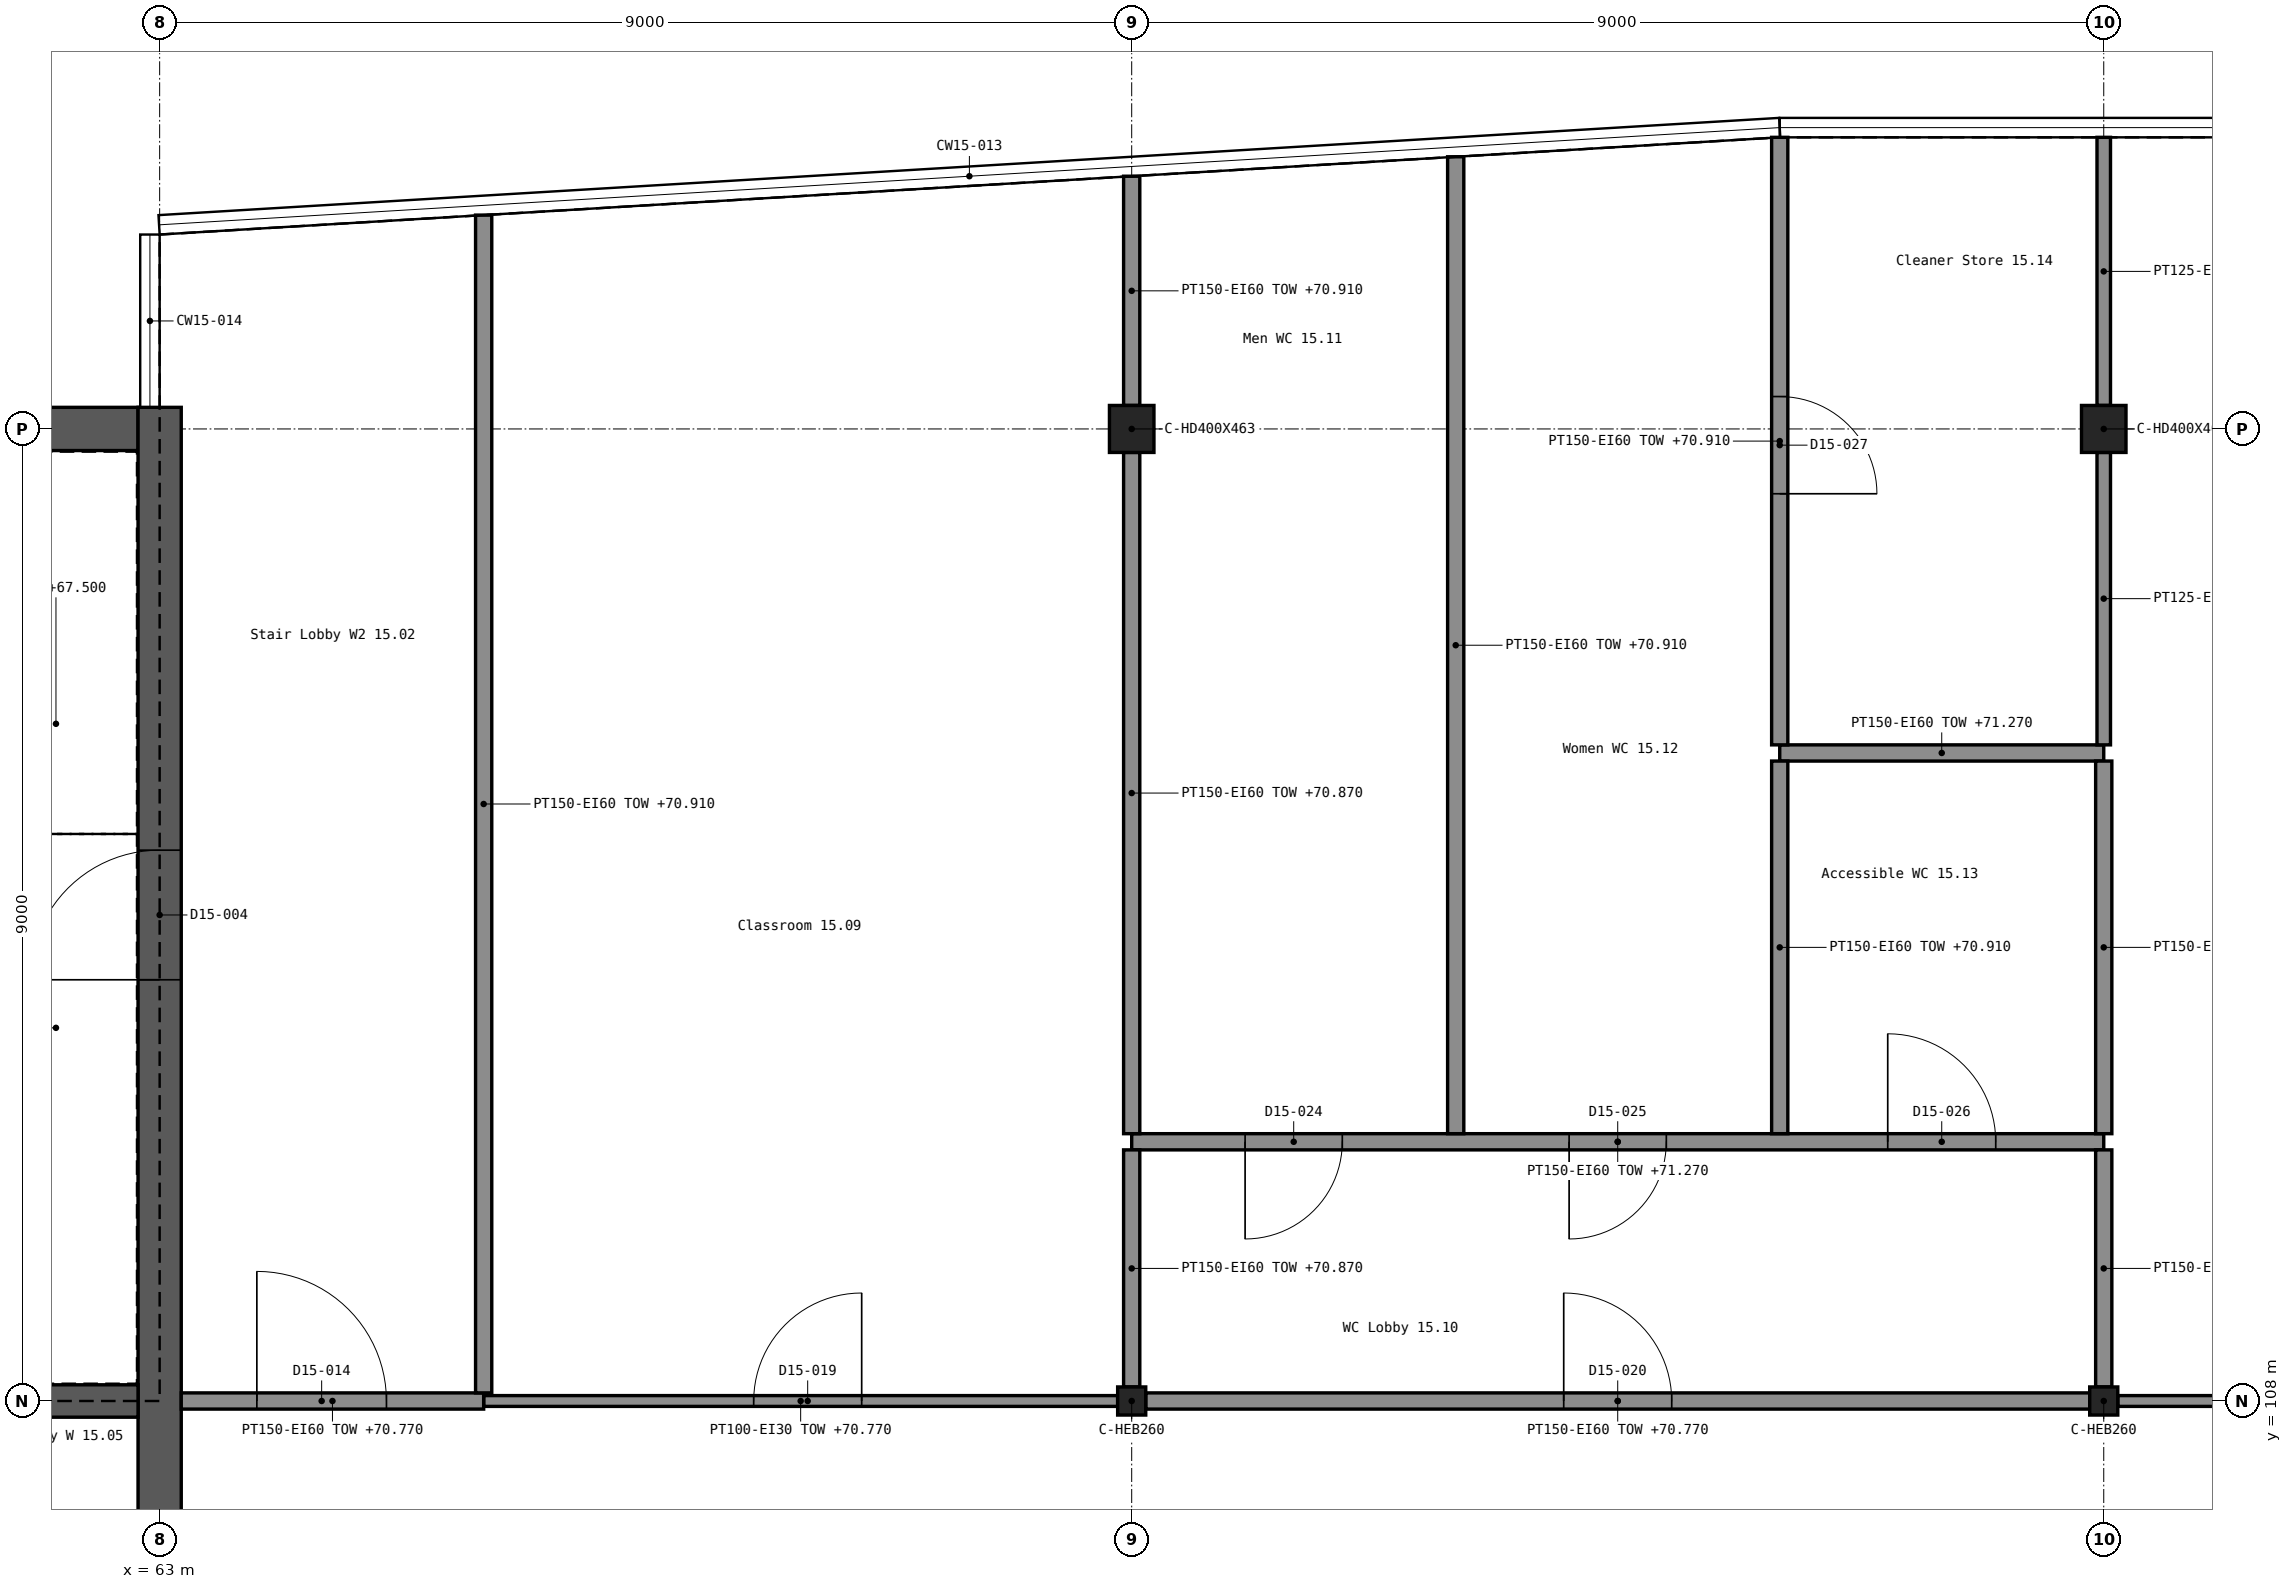
"""IFC4 building model, lengths in metres.
Left out: names, types, materials, properties, quantities, classifications, styles, units other than length and angle.
Written with IfcOpenShell. Run it as: python <this file> out.ifc"""

import sys

from ifc_helpers import new_model, si_unit, direction, frame, frame_2d, origin, origin_2d, place, context, subcontext, project, spatial, rectangle, i_section, extrude, element, fill, save


model = new_model("IFC4")
c1 = context("Model", 3, precision=1e-05, world=origin(), true_north=direction((0.0, 1.0)))
c2 = subcontext(c1, "Body", "Model", "MODEL_VIEW")
j1 = project(units=[si_unit("LENGTHUNIT", "METRE"), si_unit("PLANEANGLEUNIT", "RADIAN")], contexts=[c1])
p1 = place(None, origin())
s1 = spatial("IfcSite", under=j1, at=p1, CompositionType="ELEMENT")
p2 = place(p1, origin())
s2 = spatial("IfcBuilding", under=s1, at=p2, CompositionType="ELEMENT")
p3 = place(p2, frame((0.0, 0.0, 67.5)))
s3 = spatial("IfcBuildingStorey", under=s2, at=p3, CompositionType="ELEMENT", Elevation=67.5)
p4 = place(p3, frame((54.2, 117.0, 0.0), z_axis=(0.0, 0.0, 1.0), x_axis=(1.0, 0.0, 0.0)))
e1 = element("IfcWall", 1, at=p4, inside=s3, PredefinedType="SHEAR", context=c2, shape_type="SweptSolid", body=[
    extrude(rectangle(XDim=8.6, YDim=0.4, at=frame_2d((4.3, 0.0))), origin(), (0.0, 0.0, 1.0), 3.9),
])
p5 = place(p4, frame((4.05, 0.0, 1.2)))
e2 = element("IfcOpeningElement", 2, at=p5, cuts=e1, PredefinedType="OPENING", context=c2, shape_type="SweptSolid", body=[
    extrude(rectangle(XDim=0.9, YDim=1.5, at=frame_2d((0.45, 0.75))), frame((0.0, 0.211, 0.0), z_axis=(0.0, -1.0, 0.0), x_axis=(1.0, 0.0, 0.0)), (0.0, 0.0, 1.0), 0.422),
])
p6 = place(p3, frame((63.0, 89.8, 0.0), z_axis=(0.0, 0.0, 1.0), x_axis=(0.0, 1.0, 0.0)))
e3 = element("IfcWall", 3, at=p6, inside=s3, PredefinedType="SHEAR", context=c2, shape_type="SweptSolid", body=[
    extrude(rectangle(XDim=27.4, YDim=0.4, at=frame_2d((13.7, 0.0))), origin(), (0.0, 0.0, 1.0), 3.9),
])
p7 = place(p6, frame((4.1, 0.0, 0.0)))
e4 = element("IfcOpeningElement", 4, at=p7, cuts=e3, PredefinedType="OPENING", context=c2, shape_type="SweptSolid", body=[
    extrude(rectangle(XDim=1.2, YDim=2.1, at=frame_2d((0.6, 1.05))), frame((0.0, 0.211, 0.0), z_axis=(0.0, -1.0, 0.0), x_axis=(1.0, 0.0, 0.0)), (0.0, 0.0, 1.0), 0.422),
])
p8 = place(p6, frame((22.1, 0.0, 0.0)))
e5 = element("IfcOpeningElement", 5, at=p8, cuts=e3, PredefinedType="OPENING", context=c2, shape_type="SweptSolid", body=[
    extrude(rectangle(XDim=1.2, YDim=2.1, at=frame_2d((0.6, 1.05))), frame((0.0, 0.211, 0.0), z_axis=(0.0, -1.0, 0.0), x_axis=(1.0, 0.0, 0.0)), (0.0, 0.0, 1.0), 0.422),
])
p9 = place(p6, frame((12.5, 0.0, 0.0)))
e6 = element("IfcOpeningElement", 6, at=p9, cuts=e3, PredefinedType="OPENING", context=c2, shape_type="SweptSolid", body=[
    extrude(rectangle(XDim=2.0, YDim=2.1, at=frame_2d((1.0, 1.05))), frame((0.0, 0.211, 0.0), z_axis=(0.0, -1.0, 0.0), x_axis=(1.0, 0.0, 0.0)), (0.0, 0.0, 1.0), 0.422),
])
p10 = place(p3, frame((54.2, 108.0, 0.0), z_axis=(0.0, 0.0, 1.0), x_axis=(1.0, 0.0, 0.0)))
e7 = element("IfcWall", 7, at=p10, inside=s3, PredefinedType="SHEAR", context=c2, shape_type="SweptSolid", body=[
    extrude(rectangle(XDim=8.6, YDim=0.3, at=frame_2d((4.3, 0.0))), origin(), (0.0, 0.0, 1.0), 3.9),
])
for number, where, z_axis, x_axis in (
    (8, (72.0, 108.0, 0.0), (0.0, 0.0, 1.0), (1.0, 0.0, 0.0)),
    (9, (81.0, 108.0, 0.0), (0.0, 0.0, 1.0), (1.0, 0.0, 0.0)),
):
    element("IfcColumn", number, at=place(p3, frame(where, z_axis=z_axis, x_axis=x_axis)), inside=s3, PredefinedType="COLUMN", context=c2, shape_type="SweptSolid", body=[
        extrude(i_section(OverallWidth=0.26, OverallDepth=0.26, WebThickness=0.01, FlangeThickness=0.018, FilletRadius=0.024, at=origin_2d()), origin(), (0.0, 0.0, 1.0), 3.9),
    ])
for number, where, z_axis, x_axis in (
    (10, (72.0, 117.0, 0.0), (0.0, 0.0, 1.0), (1.0, 0.0, 0.0)),
    (11, (81.0, 117.0, 0.0), (0.0, 0.0, 1.0), (1.0, 0.0, 0.0)),
):
    element("IfcColumn", number, at=place(p3, frame(where, z_axis=z_axis, x_axis=x_axis)), inside=s3, PredefinedType="COLUMN", context=c2, shape_type="SweptSolid", body=[
        extrude(i_section(OverallWidth=0.412, OverallDepth=0.435, WebThickness=0.036, FlangeThickness=0.057, FilletRadius=0.015, at=origin_2d()), origin(), (0.0, 0.0, 1.0), 3.9),
    ])
p11 = place(p3, frame((66.0, 108.0, 0.0), z_axis=(0.0, 0.0, 1.0), x_axis=(1.0, 0.0, 0.0)))
e12 = element("IfcWall", 12, at=p11, inside=s3, PredefinedType="PARTITIONING", context=c2, shape_type="SweptSolid", body=[
    extrude(rectangle(XDim=5.87, YDim=0.1, at=frame_2d((2.935, 0.0))), origin(), (0.0, 0.0, 1.0), 3.27),
])
p12 = place(p11, frame((2.5, 0.0, 0.0)))
e13 = element("IfcOpeningElement", 13, at=p12, cuts=e12, PredefinedType="OPENING", context=c2, shape_type="SweptSolid", body=[
    extrude(rectangle(XDim=1.0, YDim=2.1, at=frame_2d((0.5, 1.05))), frame((0.0, 0.061, 0.0), z_axis=(0.0, -1.0, 0.0), x_axis=(1.0, 0.0, 0.0)), (0.0, 0.0, 1.0), 0.122),
])
p13 = place(p3, frame((81.13, 108.0, 0.0), z_axis=(0.0, 0.0, 1.0), x_axis=(1.0, 0.0, 0.0)))
e14 = element("IfcWall", 14, at=p13, inside=s3, PredefinedType="PARTITIONING", context=c2, shape_type="SweptSolid", body=[
    extrude(rectangle(XDim=8.74, YDim=0.1, at=frame_2d((4.37, 0.0))), origin(), (0.0, 0.0, 1.0), 3.27),
])
p14 = place(p13, frame((5.845, 0.0, 0.0)))
e15 = element("IfcOpeningElement", 15, at=p14, cuts=e14, PredefinedType="OPENING", context=c2, shape_type="SweptSolid", body=[
    extrude(rectangle(XDim=1.8, YDim=2.1, at=frame_2d((0.9, 1.05))), frame((0.0, 0.061, 0.0), z_axis=(0.0, -1.0, 0.0), x_axis=(1.0, 0.0, 0.0)), (0.0, 0.0, 1.0), 0.122),
])
p15 = place(p3, frame((63.2, 108.0, 0.0), z_axis=(0.0, 0.0, 1.0), x_axis=(1.0, 0.0, 0.0)))
e16 = element("IfcWall", 16, at=p15, inside=s3, PredefinedType="PARTITIONING", context=c2, shape_type="SweptSolid", body=[
    extrude(rectangle(XDim=2.8, YDim=0.15, at=frame_2d((1.4, 0.0))), origin(), (0.0, 0.0, 1.0), 3.27),
])
p16 = place(p15, frame((0.7, 0.0, 0.0)))
e17 = element("IfcOpeningElement", 17, at=p16, cuts=e16, PredefinedType="OPENING", context=c2, shape_type="SweptSolid", body=[
    extrude(rectangle(XDim=1.2, YDim=2.1, at=frame_2d((0.6, 1.05))), frame((0.0, 0.086, 0.0), z_axis=(0.0, -1.0, 0.0), x_axis=(1.0, 0.0, 0.0)), (0.0, 0.0, 1.0), 0.172),
])
p17 = place(p3, frame((72.13, 108.0, 0.0), z_axis=(0.0, 0.0, 1.0), x_axis=(1.0, 0.0, 0.0)))
e18 = element("IfcWall", 18, at=p17, inside=s3, PredefinedType="PARTITIONING", context=c2, shape_type="SweptSolid", body=[
    extrude(rectangle(XDim=8.74, YDim=0.15, at=frame_2d((4.37, 0.0))), origin(), (0.0, 0.0, 1.0), 3.27),
])
p18 = place(p17, frame((3.87, 0.0, 0.0)))
e19 = element("IfcOpeningElement", 19, at=p18, cuts=e18, PredefinedType="OPENING", context=c2, shape_type="SweptSolid", body=[
    extrude(rectangle(XDim=1.0, YDim=2.1, at=frame_2d((0.5, 1.05))), frame((0.0, 0.086, 0.0), z_axis=(0.0, -1.0, 0.0), x_axis=(1.0, 0.0, 0.0)), (0.0, 0.0, 1.0), 0.172),
])
p19 = place(p3, frame((72.0, 110.4, 0.0), z_axis=(0.0, 0.0, 1.0), x_axis=(1.0, 0.0, 0.0)))
e20 = element("IfcWall", 20, at=p19, inside=s3, PredefinedType="PARTITIONING", context=c2, shape_type="SweptSolid", body=[
    extrude(rectangle(XDim=9.0, YDim=0.15, at=frame_2d((4.5, 0.0))), origin(), (0.0, 0.0, 1.0), 3.77),
])
p20 = place(p19, frame((1.05, 0.0, 0.0)))
e21 = element("IfcOpeningElement", 21, at=p20, cuts=e20, PredefinedType="OPENING", context=c2, shape_type="SweptSolid", body=[
    extrude(rectangle(XDim=0.9, YDim=2.1, at=frame_2d((0.45, 1.05))), frame((0.0, 0.086, 0.0), z_axis=(0.0, -1.0, 0.0), x_axis=(1.0, 0.0, 0.0)), (0.0, 0.0, 1.0), 0.172),
])
p21 = place(p19, frame((4.05, 0.0, 0.0)))
e22 = element("IfcOpeningElement", 22, at=p21, cuts=e20, PredefinedType="OPENING", context=c2, shape_type="SweptSolid", body=[
    extrude(rectangle(XDim=0.9, YDim=2.1, at=frame_2d((0.45, 1.05))), frame((0.0, 0.086, 0.0), z_axis=(0.0, -1.0, 0.0), x_axis=(1.0, 0.0, 0.0)), (0.0, 0.0, 1.0), 0.172),
])
p22 = place(p19, frame((7.0, 0.0, 0.0)))
e23 = element("IfcOpeningElement", 23, at=p22, cuts=e20, PredefinedType="OPENING", context=c2, shape_type="SweptSolid", body=[
    extrude(rectangle(XDim=1.0, YDim=2.1, at=frame_2d((0.5, 1.05))), frame((0.0, 0.086, 0.0), z_axis=(0.0, -1.0, 0.0), x_axis=(1.0, 0.0, 0.0)), (0.0, 0.0, 1.0), 0.172),
])
p23 = place(p3, frame((78.0, 114.0, 0.0), z_axis=(0.0, 0.0, 1.0), x_axis=(1.0, 0.0, 0.0)))
e24 = element("IfcWall", 24, at=p23, inside=s3, PredefinedType="PARTITIONING", context=c2, shape_type="SweptSolid", body=[
    extrude(rectangle(XDim=3.0, YDim=0.15, at=frame_2d((1.5, 0.0))), origin(), (0.0, 0.0, 1.0), 3.77),
])
p24 = place(p3, frame((66.0, 108.075, 0.0), z_axis=(0.0, 0.0, 1.0), x_axis=(0.0, 1.0, 0.0)))
e25 = element("IfcWall", 25, at=p24, inside=s3, PredefinedType="PARTITIONING", context=c2, shape_type="SweptSolid", body=[
    extrude(rectangle(XDim=10.905, YDim=0.15, at=frame_2d((5.453, 0.0))), origin(), (0.0, 0.0, 1.0), 3.41),
])
p25 = place(p3, frame((72.0, 108.13, 0.0), z_axis=(0.0, 0.0, 1.0), x_axis=(0.0, 1.0, 0.0)))
e26 = element("IfcWall", 26, at=p25, inside=s3, PredefinedType="PARTITIONING", context=c2, shape_type="SweptSolid", body=[
    extrude(rectangle(XDim=2.195, YDim=0.15, at=frame_2d((1.098, 0.0))), origin(), (0.0, 0.0, 1.0), 3.37),
])
p26 = place(p3, frame((72.0, 110.475, 0.0), z_axis=(0.0, 0.0, 1.0), x_axis=(0.0, 1.0, 0.0)))
e27 = element("IfcWall", 27, at=p26, inside=s3, PredefinedType="PARTITIONING", context=c2, shape_type="SweptSolid", body=[
    extrude(rectangle(XDim=6.307, YDim=0.15, at=frame_2d((3.154, 0.0))), origin(), (0.0, 0.0, 1.0), 3.37),
])
p27 = place(p3, frame((72.0, 117.218, 0.0), z_axis=(0.0, 0.0, 1.0), x_axis=(0.0, 1.0, 0.0)))
e28 = element("IfcWall", 28, at=p27, inside=s3, PredefinedType="PARTITIONING", context=c2, shape_type="SweptSolid", body=[
    extrude(rectangle(XDim=2.123, YDim=0.15, at=frame_2d((1.061, 0.0))), origin(), (0.0, 0.0, 1.0), 3.41),
])
p28 = place(p3, frame((75.0, 110.475, 0.0), z_axis=(0.0, 0.0, 1.0), x_axis=(0.0, 1.0, 0.0)))
e29 = element("IfcWall", 29, at=p28, inside=s3, PredefinedType="PARTITIONING", context=c2, shape_type="SweptSolid", body=[
    extrude(rectangle(XDim=9.045, YDim=0.15, at=frame_2d((4.522, 0.0))), origin(), (0.0, 0.0, 1.0), 3.41),
])
p29 = place(p3, frame((78.0, 110.475, 0.0), z_axis=(0.0, 0.0, 1.0), x_axis=(0.0, 1.0, 0.0)))
e30 = element("IfcWall", 30, at=p29, inside=s3, PredefinedType="PARTITIONING", context=c2, shape_type="SweptSolid", body=[
    extrude(rectangle(XDim=3.45, YDim=0.15, at=frame_2d((1.725, 0.0))), origin(), (0.0, 0.0, 1.0), 3.41),
])
p30 = place(p3, frame((78.0, 114.075, 0.0), z_axis=(0.0, 0.0, 1.0), x_axis=(0.0, 1.0, 0.0)))
e31 = element("IfcWall", 31, at=p30, inside=s3, PredefinedType="PARTITIONING", context=c2, shape_type="SweptSolid", body=[
    extrude(rectangle(XDim=5.625, YDim=0.15, at=frame_2d((2.812, 0.0))), origin(), (0.0, 0.0, 1.0), 3.41),
])
p31 = place(p30, frame((2.325, 0.0, 0.0)))
e32 = element("IfcOpeningElement", 32, at=p31, cuts=e31, PredefinedType="OPENING", context=c2, shape_type="SweptSolid", body=[
    extrude(rectangle(XDim=0.9, YDim=2.1, at=frame_2d((0.45, 1.05))), frame((0.0, 0.086, 0.0), z_axis=(0.0, -1.0, 0.0), x_axis=(1.0, 0.0, 0.0)), (0.0, 0.0, 1.0), 0.172),
])
p32 = place(p3, frame((81.0, 114.075, 0.0), z_axis=(0.0, 0.0, 1.0), x_axis=(0.0, 1.0, 0.0)))
e33 = element("IfcWall", 33, at=p32, inside=s3, PredefinedType="PARTITIONING", context=c2, shape_type="SweptSolid", body=[
    extrude(rectangle(XDim=2.708, YDim=0.125, at=frame_2d((1.354, 0.0))), origin(), (0.0, 0.0, 1.0), 3.37),
])
p33 = place(p3, frame((81.0, 117.218, 0.0), z_axis=(0.0, 0.0, 1.0), x_axis=(0.0, 1.0, 0.0)))
e34 = element("IfcWall", 34, at=p33, inside=s3, PredefinedType="PARTITIONING", context=c2, shape_type="SweptSolid", body=[
    extrude(rectangle(XDim=2.482, YDim=0.125, at=frame_2d((1.241, 0.0))), origin(), (0.0, 0.0, 1.0), 3.41),
])
p34 = place(p3, frame((81.0, 108.13, 0.0), z_axis=(0.0, 0.0, 1.0), x_axis=(0.0, 1.0, 0.0)))
e35 = element("IfcWall", 35, at=p34, inside=s3, PredefinedType="PARTITIONING", context=c2, shape_type="SweptSolid", body=[
    extrude(rectangle(XDim=2.195, YDim=0.15, at=frame_2d((1.098, 0.0))), origin(), (0.0, 0.0, 1.0), 3.37),
])
p35 = place(p3, frame((81.0, 110.475, 0.0), z_axis=(0.0, 0.0, 1.0), x_axis=(0.0, 1.0, 0.0)))
e36 = element("IfcWall", 36, at=p35, inside=s3, PredefinedType="PARTITIONING", context=c2, shape_type="SweptSolid", body=[
    extrude(rectangle(XDim=3.45, YDim=0.15, at=frame_2d((1.725, 0.0))), origin(), (0.0, 0.0, 1.0), 3.37),
])
p36 = place(p8, origin())
e37 = element("IfcDoor", 37, at=p36, inside=s3, OperationType="SINGLE_SWING_LEFT", PredefinedType="DOOR", context=c2, shape_type="SweptSolid", body=[
    extrude(rectangle(XDim=1.2, YDim=2.1, at=frame_2d((0.6, 1.05))), frame((0.0, 0.025, 0.0), z_axis=(0.0, -1.0, 0.0), x_axis=(1.0, 0.0, 0.0)), (0.0, 0.0, 1.0), 0.05),
])
fill(e5, e37)
p37 = place(p16, origin())
e38 = element("IfcDoor", 38, at=p37, inside=s3, OperationType="SINGLE_SWING_LEFT", PredefinedType="DOOR", context=c2, shape_type="SweptSolid", body=[
    extrude(rectangle(XDim=1.2, YDim=2.1, at=frame_2d((0.6, 1.05))), frame((0.0, 0.025, 0.0), z_axis=(0.0, -1.0, 0.0), x_axis=(1.0, 0.0, 0.0)), (0.0, 0.0, 1.0), 0.05),
])
fill(e17, e38)
p38 = place(p12, origin())
e39 = element("IfcDoor", 39, at=p38, inside=s3, OperationType="SINGLE_SWING_RIGHT", PredefinedType="DOOR", context=c2, shape_type="SweptSolid", body=[
    extrude(rectangle(XDim=1.0, YDim=2.1, at=frame_2d((0.5, 1.05))), frame((0.0, 0.025, 0.0), z_axis=(0.0, -1.0, 0.0), x_axis=(1.0, 0.0, 0.0)), (0.0, 0.0, 1.0), 0.05),
])
fill(e13, e39)
p39 = place(p18, origin())
e40 = element("IfcDoor", 40, at=p39, inside=s3, OperationType="SINGLE_SWING_LEFT", PredefinedType="DOOR", context=c2, shape_type="SweptSolid", body=[
    extrude(rectangle(XDim=1.0, YDim=2.1, at=frame_2d((0.5, 1.05))), frame((0.0, 0.025, 0.0), z_axis=(0.0, -1.0, 0.0), x_axis=(1.0, 0.0, 0.0)), (0.0, 0.0, 1.0), 0.05),
])
fill(e19, e40)
p40 = place(p20, frame((0.9, 0.0, 0.0), z_axis=(0.0, 0.0, 1.0), x_axis=(-1.0, 0.0, 0.0)))
e41 = element("IfcDoor", 41, at=p40, inside=s3, OperationType="SINGLE_SWING_RIGHT", PredefinedType="DOOR", context=c2, shape_type="SweptSolid", body=[
    extrude(rectangle(XDim=0.9, YDim=2.1, at=frame_2d((0.45, 1.05))), frame((0.0, 0.025, 0.0), z_axis=(0.0, -1.0, 0.0), x_axis=(1.0, 0.0, 0.0)), (0.0, 0.0, 1.0), 0.05),
])
fill(e21, e41)
p41 = place(p21, frame((0.9, 0.0, 0.0), z_axis=(0.0, 0.0, 1.0), x_axis=(-1.0, 0.0, 0.0)))
e42 = element("IfcDoor", 42, at=p41, inside=s3, OperationType="SINGLE_SWING_RIGHT", PredefinedType="DOOR", context=c2, shape_type="SweptSolid", body=[
    extrude(rectangle(XDim=0.9, YDim=2.1, at=frame_2d((0.45, 1.05))), frame((0.0, 0.025, 0.0), z_axis=(0.0, -1.0, 0.0), x_axis=(1.0, 0.0, 0.0)), (0.0, 0.0, 1.0), 0.05),
])
fill(e22, e42)
p42 = place(p22, origin())
e43 = element("IfcDoor", 43, at=p42, inside=s3, OperationType="SINGLE_SWING_LEFT", PredefinedType="DOOR", context=c2, shape_type="SweptSolid", body=[
    extrude(rectangle(XDim=1.0, YDim=2.1, at=frame_2d((0.5, 1.05))), frame((0.0, 0.025, 0.0), z_axis=(0.0, -1.0, 0.0), x_axis=(1.0, 0.0, 0.0)), (0.0, 0.0, 1.0), 0.05),
])
fill(e23, e43)
p43 = place(p31, frame((0.9, 0.0, 0.0), z_axis=(0.0, 0.0, 1.0), x_axis=(-1.0, 0.0, 0.0)))
e44 = element("IfcDoor", 44, at=p43, inside=s3, OperationType="SINGLE_SWING_RIGHT", PredefinedType="DOOR", context=c2, shape_type="SweptSolid", body=[
    extrude(rectangle(XDim=0.9, YDim=2.1, at=frame_2d((0.45, 1.05))), frame((0.0, 0.025, 0.0), z_axis=(0.0, -1.0, 0.0), x_axis=(1.0, 0.0, 0.0)), (0.0, 0.0, 1.0), 0.05),
])
fill(e32, e44)
save(model, sys.argv[1])
